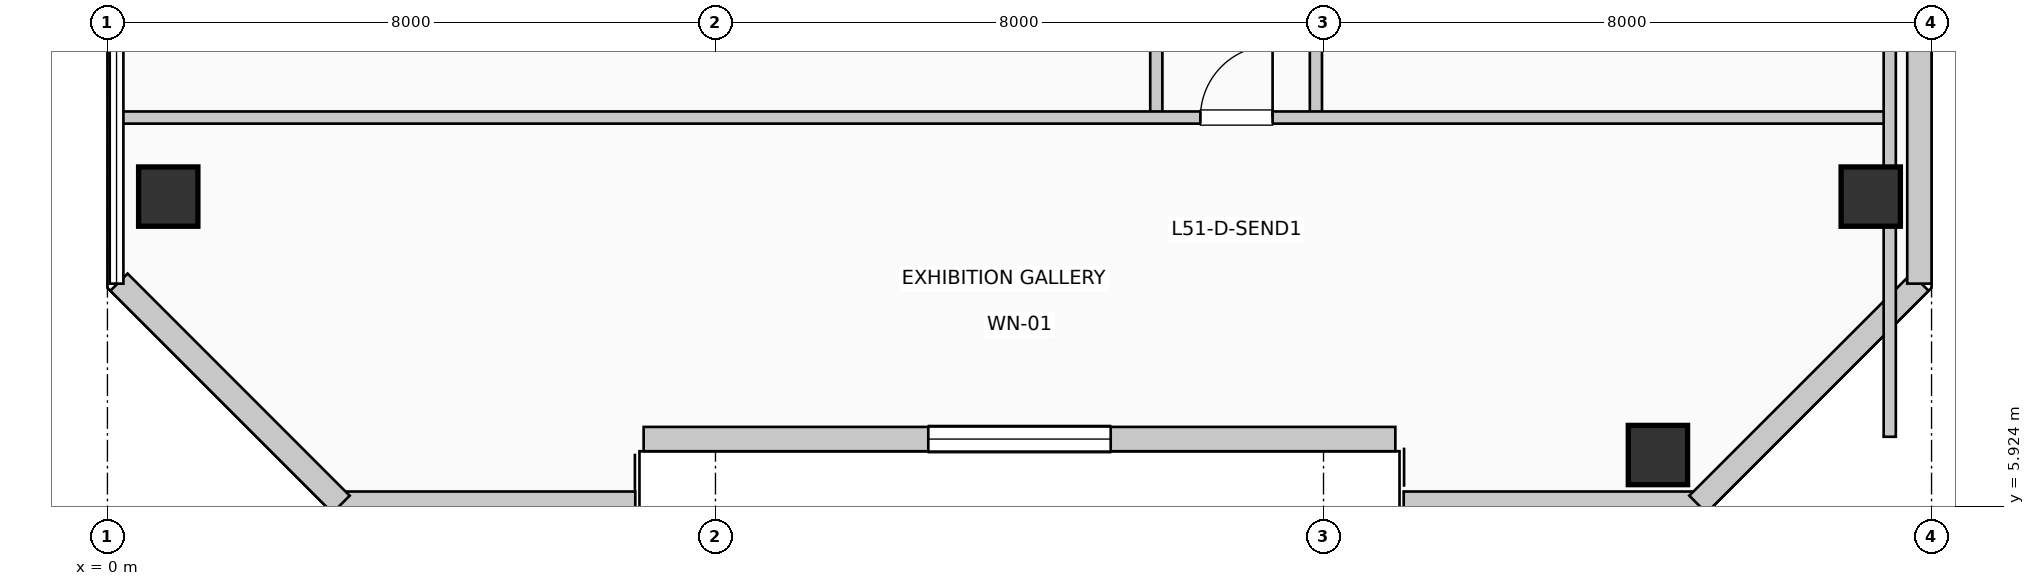
"""IFC4 building model, lengths in metres.
Left out: names, types, materials, properties, quantities, classifications, styles, units other than length and angle.
Written with IfcOpenShell. Run it as: python <this file> out.ifc"""

import sys

from ifc_helpers import new_model, si_unit, direction, frame, frame_2d, origin, origin_2d, place, context, subcontext, project, spatial, rectangle, extrude, element, fill, save


model = new_model("IFC4")
c1 = context("Model", 3, precision=1e-05, world=origin(), true_north=direction((0.0, 1.0)))
c2 = subcontext(c1, "Body", "Model", "MODEL_VIEW")
j1 = project(units=[si_unit("LENGTHUNIT", "METRE"), si_unit("PLANEANGLEUNIT", "RADIAN")], contexts=[c1])
p1 = place(None, origin())
s1 = spatial("IfcSite", under=j1, at=p1, CompositionType="ELEMENT")
p2 = place(p1, origin())
s2 = spatial("IfcBuilding", under=s1, at=p2, CompositionType="ELEMENT")
p3 = place(p2, frame((0.0, 0.0, 211.2)))
s3 = spatial("IfcBuildingStorey", under=s2, at=p3, CompositionType="ELEMENT", Elevation=211.2)
for number, where, z_axis, x_axis in (
    (1, (0.8, 10.0, 0.0), (0.0, 0.0, 1.0), (1.0, 0.0, 0.0)),
    (2, (20.4, 6.6, 0.0), (0.0, 0.0, 1.0), (1.0, 0.0, 0.0)),
    (3, (23.2, 10.0, 0.0), (0.0, 0.0, 1.0), (1.0, 0.0, 0.0)),
):
    element("IfcColumn", number, at=place(p3, frame(where, z_axis=z_axis, x_axis=x_axis)), inside=s3, PredefinedType="COLUMN", context=c2, shape_type="SweptSolid", body=[
        extrude(rectangle(XDim=0.78, YDim=0.78, at=origin_2d()), origin(), (0.0, 0.0, 1.0), 3.96),
    ])
p4 = place(p3, frame((3.055, 5.96, 0.0), z_axis=(0.0, 0.0, 1.0), x_axis=(1.0, 0.0, 0.0)))
e4 = element("IfcWall", 4, at=p4, inside=s3, PredefinedType="SOLIDWALL", context=c2, shape_type="SweptSolid", body=[
    extrude(rectangle(XDim=3.89, YDim=0.32, at=frame_2d((1.945, 0.0))), origin(), (0.0, 0.0, 1.0), 3.71),
])
p5 = place(p3, frame((7.055, 6.81, 0.0), z_axis=(0.0, 0.0, 1.0), x_axis=(1.0, 0.0, 0.0)))
e5 = element("IfcWall", 5, at=p5, inside=s3, PredefinedType="SOLIDWALL", context=c2, shape_type="SweptSolid", body=[
    extrude(rectangle(XDim=9.89, YDim=0.32, at=frame_2d((4.945, 0.0))), origin(), (0.0, 0.0, 1.0), 3.71),
])
p6 = place(p5, frame((3.745, 0.0, 0.85)))
e6 = element("IfcOpeningElement", 6, at=p6, cuts=e5, PredefinedType="OPENING", context=c2, shape_type="SweptSolid", body=[
    extrude(rectangle(XDim=2.4, YDim=2.05, at=frame_2d((1.2, 1.025))), frame((0.0, 0.17, 0.0), z_axis=(0.0, -1.0, 0.0), x_axis=(1.0, 0.0, 0.0)), (0.0, 0.0, 1.0), 0.34),
])
p7 = place(p3, frame((17.055, 5.96, 0.0), z_axis=(0.0, 0.0, 1.0), x_axis=(1.0, 0.0, 0.0)))
e7 = element("IfcWall", 7, at=p7, inside=s3, PredefinedType="SOLIDWALL", context=c2, shape_type="SweptSolid", body=[
    extrude(rectangle(XDim=3.89, YDim=0.32, at=frame_2d((1.945, 0.0))), origin(), (0.0, 0.0, 1.0), 3.71),
])
p8 = place(p3, frame((20.926, 5.952, 0.0), z_axis=(0.0, 0.0, 1.0), x_axis=(0.707077242712, 0.707136318428, 0.0)))
e8 = element("IfcWall", 8, at=p8, inside=s3, PredefinedType="SOLIDWALL", context=c2, shape_type="SweptSolid", body=[
    extrude(rectangle(XDim=4.133, YDim=0.32, at=frame_2d((2.066, 0.0))), origin(), (0.0, 0.0, 1.0), 3.71),
])
p9 = place(p3, frame((23.84, 8.855, 0.0), z_axis=(0.0, 0.0, 1.0), x_axis=(0.0, 1.0, 0.0)))
e9 = element("IfcWall", 9, at=p9, inside=s3, PredefinedType="SOLIDWALL", context=c2, shape_type="SweptSolid", body=[
    extrude(rectangle(XDim=11.09, YDim=0.32, at=frame_2d((5.545, 0.0))), origin(), (0.0, 0.0, 1.0), 3.71),
])
p10 = place(p3, frame((0.152, 8.874, 0.0), z_axis=(0.0, 0.0, 1.0), x_axis=(0.707077242712, -0.707136318428, 0.0)))
e10 = element("IfcWall", 10, at=p10, inside=s3, PredefinedType="SOLIDWALL", context=c2, shape_type="SweptSolid", body=[
    extrude(rectangle(XDim=4.133, YDim=0.32, at=frame_2d((2.066, 0.0))), origin(), (0.0, 0.0, 1.0), 3.71),
])
p11 = place(p3, frame((13.8, 11.04, 0.0), z_axis=(0.0, 0.0, 1.0), x_axis=(0.0, 1.0, 0.0)))
e11 = element("IfcWall", 11, at=p11, inside=s3, PredefinedType="PARTITIONING", context=c2, shape_type="SweptSolid", body=[
    extrude(rectangle(XDim=18.36, YDim=0.16, at=frame_2d((9.18, 0.0))), origin(), (0.0, 0.0, 1.0), 3.71),
])
p12 = place(p11, frame((2.495, 0.0, 0.0), z_axis=(0.0, 0.0, 1.0), x_axis=(-1.0, 0.0, 0.0)))
e12 = element("IfcOpeningElement", 12, at=p12, cuts=e11, PredefinedType="OPENING", context=c2, shape_type="SweptSolid", body=[
    extrude(rectangle(XDim=0.95, YDim=2.15, at=frame_2d((0.475, 1.075))), frame((0.0, 0.09, 0.0), z_axis=(0.0, -1.0, 0.0), x_axis=(1.0, 0.0, 0.0)), (0.0, 0.0, 1.0), 0.18),
])
p13 = place(p11, frame((7.084, 0.0, 0.0), z_axis=(0.0, 0.0, 1.0), x_axis=(-1.0, 0.0, 0.0)))
e13 = element("IfcOpeningElement", 13, at=p13, cuts=e11, PredefinedType="OPENING", context=c2, shape_type="SweptSolid", body=[
    extrude(rectangle(XDim=0.95, YDim=2.15, at=frame_2d((0.475, 1.075))), frame((0.0, 0.09, 0.0), z_axis=(0.0, -1.0, 0.0), x_axis=(1.0, 0.0, 0.0)), (0.0, 0.0, 1.0), 0.18),
])
p14 = place(p11, frame((12.042, 0.0, 0.0), z_axis=(0.0, 0.0, 1.0), x_axis=(-1.0, 0.0, 0.0)))
e14 = element("IfcOpeningElement", 14, at=p14, cuts=e11, PredefinedType="OPENING", context=c2, shape_type="SweptSolid", body=[
    extrude(rectangle(XDim=0.95, YDim=2.15, at=frame_2d((0.475, 1.075))), frame((0.0, 0.09, 0.0), z_axis=(0.0, -1.0, 0.0), x_axis=(1.0, 0.0, 0.0)), (0.0, 0.0, 1.0), 0.18),
])
p15 = place(p11, frame((16.632, 0.0, 0.0), z_axis=(0.0, 0.0, 1.0), x_axis=(-1.0, 0.0, 0.0)))
e15 = element("IfcOpeningElement", 15, at=p15, cuts=e11, PredefinedType="OPENING", context=c2, shape_type="SweptSolid", body=[
    extrude(rectangle(XDim=0.95, YDim=2.15, at=frame_2d((0.475, 1.075))), frame((0.0, 0.09, 0.0), z_axis=(0.0, -1.0, 0.0), x_axis=(1.0, 0.0, 0.0)), (0.0, 0.0, 1.0), 0.18),
])
p16 = place(p3, frame((15.9, 11.04, 0.0), z_axis=(0.0, 0.0, 1.0), x_axis=(0.0, 1.0, 0.0)))
e16 = element("IfcWall", 16, at=p16, inside=s3, PredefinedType="PARTITIONING", context=c2, shape_type="SweptSolid", body=[
    extrude(rectangle(XDim=18.36, YDim=0.16, at=frame_2d((9.18, 0.0))), origin(), (0.0, 0.0, 1.0), 3.71),
])
p17 = place(p16, frame((2.83, 0.0, 0.0)))
e17 = element("IfcOpeningElement", 17, at=p17, cuts=e16, PredefinedType="OPENING", context=c2, shape_type="SweptSolid", body=[
    extrude(rectangle(XDim=0.95, YDim=2.15, at=frame_2d((0.475, 1.075))), frame((0.0, 0.09, 0.0), z_axis=(0.0, -1.0, 0.0), x_axis=(1.0, 0.0, 0.0)), (0.0, 0.0, 1.0), 0.18),
])
p18 = place(p16, frame((9.256, 0.0, 0.0)))
e18 = element("IfcOpeningElement", 18, at=p18, cuts=e16, PredefinedType="OPENING", context=c2, shape_type="SweptSolid", body=[
    extrude(rectangle(XDim=0.95, YDim=2.15, at=frame_2d((0.475, 1.075))), frame((0.0, 0.09, 0.0), z_axis=(0.0, -1.0, 0.0), x_axis=(1.0, 0.0, 0.0)), (0.0, 0.0, 1.0), 0.18),
])
p19 = place(p16, frame((15.131, 0.0, 0.0)))
e19 = element("IfcOpeningElement", 19, at=p19, cuts=e16, PredefinedType="OPENING", context=c2, shape_type="SweptSolid", body=[
    extrude(rectangle(XDim=0.95, YDim=2.15, at=frame_2d((0.475, 1.075))), frame((0.0, 0.09, 0.0), z_axis=(0.0, -1.0, 0.0), x_axis=(1.0, 0.0, 0.0)), (0.0, 0.0, 1.0), 0.18),
])
p20 = place(p3, frame((0.19, 11.04, 0.0), z_axis=(0.0, 0.0, 1.0), x_axis=(1.0, 0.0, 0.0)))
e20 = element("IfcWall", 20, at=p20, inside=s3, PredefinedType="PARTITIONING", context=c2, shape_type="SweptSolid", body=[
    extrude(rectangle(XDim=23.26, YDim=0.16, at=frame_2d((11.63, 0.0))), origin(), (0.0, 0.0, 1.0), 3.71),
])
p21 = place(p20, frame((14.19, 0.0, 0.0)))
e21 = element("IfcOpeningElement", 21, at=p21, cuts=e20, PredefinedType="OPENING", context=c2, shape_type="SweptSolid", body=[
    extrude(rectangle(XDim=0.95, YDim=2.15, at=frame_2d((0.475, 1.075))), frame((0.0, 0.09, 0.0), z_axis=(0.0, -1.0, 0.0), x_axis=(1.0, 0.0, 0.0)), (0.0, 0.0, 1.0), 0.18),
])
p22 = place(p3, frame((23.45, 6.84, 0.0), z_axis=(0.0, 0.0, 1.0), x_axis=(0.0, 1.0, 0.0)))
e22 = element("IfcWall", 22, at=p22, inside=s3, PredefinedType="PARTITIONING", context=c2, shape_type="SweptSolid", body=[
    extrude(rectangle(XDim=22.56, YDim=0.16, at=frame_2d((11.28, 0.0))), origin(), (0.0, 0.0, 1.0), 3.095),
])
p23 = place(p6, origin())
e23 = element("IfcWindow", 23, at=p23, inside=s3, PartitioningType="SINGLE_PANEL", PredefinedType="WINDOW", context=c2, shape_type="SweptSolid", body=[
    extrude(rectangle(XDim=2.4, YDim=2.05, at=frame_2d((1.2, 1.025))), frame((0.0, 0.03, 0.0), z_axis=(0.0, -1.0, 0.0), x_axis=(1.0, 0.0, 0.0)), (0.0, 0.0, 1.0), 0.06),
])
fill(e6, e23)
p24 = place(p21, origin())
e24 = element("IfcDoor", 24, at=p24, inside=s3, OperationType="SINGLE_SWING_RIGHT", PredefinedType="DOOR", context=c2, shape_type="SweptSolid", body=[
    extrude(rectangle(XDim=0.95, YDim=2.15, at=frame_2d((0.475, 1.075))), frame((0.0, 0.025, 0.0), z_axis=(0.0, -1.0, 0.0), x_axis=(1.0, 0.0, 0.0)), (0.0, 0.0, 1.0), 0.05),
])
fill(e21, e24)
save(model, sys.argv[1])
